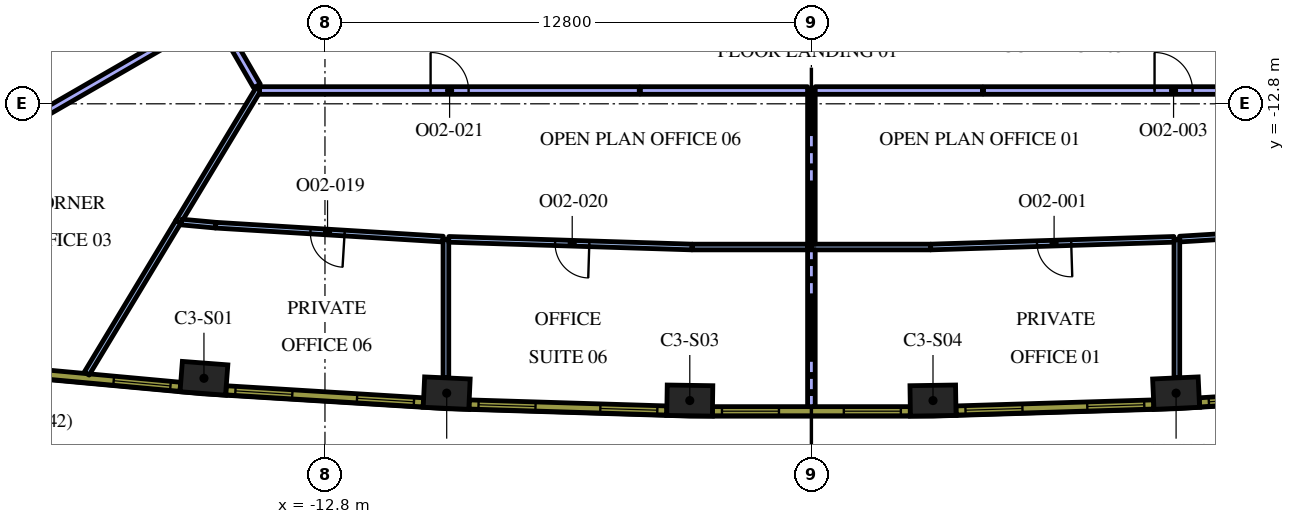
"""IFC4 building model, lengths in metres.
Left out: names, types, materials, properties, quantities, classifications, styles, units other than length and angle.
Written with IfcOpenShell. Run it as: python <this file> out.ifc"""

import sys

from ifc_helpers import new_model, si_unit, direction, frame, frame_2d, origin, origin_2d, place, context, subcontext, project, spatial, rectangle, extrude, element, fill, save


model = new_model("IFC4")
c1 = context("Model", 3, precision=1e-05, world=origin(), true_north=direction((0.0, 1.0)))
c2 = subcontext(c1, "Body", "Model", "MODEL_VIEW")
j1 = project(units=[si_unit("LENGTHUNIT", "METRE"), si_unit("PLANEANGLEUNIT", "RADIAN")], contexts=[c1])
p1 = place(None, origin())
s1 = spatial("IfcSite", under=j1, at=p1, CompositionType="ELEMENT")
p2 = place(p1, origin())
s2 = spatial("IfcBuilding", under=s1, at=p2, CompositionType="ELEMENT")
p3 = place(p2, frame((0.0, 0.0, 154.2)))
s3 = spatial("IfcBuildingStorey", under=s2, at=p3, CompositionType="ELEMENT", Elevation=154.2)
for number, where, z_axis, x_axis in (
    (1, (-15.985, -20.022, 0.0), (0.0, 0.0, 1.0), (0.997, -0.076, 0.0)),
    (2, (-9.597, -20.413, 0.0), (0.0, 0.0, 1.0), (0.999, -0.046, 0.0)),
    (3, (-3.2, -20.608, 0.0), (0.0, 0.0, 1.0), (1.0, -0.015, 0.0)),
    (4, (3.2, -20.608, 0.0), (0.0, 0.0, 1.0), (1.0, 0.015, 0.0)),
    (5, (9.597, -20.413, 0.0), (0.0, 0.0, 1.0), (0.999, 0.046, 0.0)),
):
    element("IfcColumn", number, at=place(p3, frame(where, z_axis=z_axis, x_axis=x_axis)), inside=s3, PredefinedType="COLUMN", context=c2, shape_type="SweptSolid", body=[
        extrude(rectangle(XDim=1.2, YDim=0.8, at=origin_2d()), origin(), (0.0, 0.0, 1.0), 4.2),
    ])
p4 = place(p3, frame((9.617, -16.364, 0.0), z_axis=(0.0, 0.0, 1.0), x_axis=(0.0, -1.0, 0.0)))
e6 = element("IfcWall", 6, at=p4, inside=s3, PredefinedType="PARTITIONING", context=c2, shape_type="SweptSolid", body=[
    extrude(rectangle(XDim=3.647, YDim=0.15, at=frame_2d((1.824, 0.0))), origin(), (0.0, 0.0, 1.0), 3.15),
])
p5 = place(p3, frame((0.0, -16.568, 0.0), z_axis=(0.0, 0.0, 1.0), x_axis=(1.0, 0.0, 0.0)))
e7 = element("IfcWall", 7, at=p5, inside=s3, PredefinedType="PARTITIONING", context=c2, shape_type="SweptSolid", body=[
    extrude(rectangle(XDim=3.138, YDim=0.15, at=frame_2d((1.569, 0.0))), origin(), (0.0, 0.0, 1.0), 3.15),
])
p6 = place(p3, frame((9.542, -16.366, 0.0), z_axis=(0.0, 0.0, 1.0), x_axis=(-0.999504575396, -0.031473858384, 0.0)))
e8 = element("IfcWall", 8, at=p6, inside=s3, PredefinedType="PARTITIONING", context=c2, shape_type="SweptSolid", body=[
    extrude(rectangle(XDim=6.407, YDim=0.15, at=frame_2d((3.204, 0.0))), origin(), (0.0, 0.0, 1.0), 3.15),
])
p7 = place(p6, frame((2.707, 0.0, 0.0)))
e9 = element("IfcOpeningElement", 9, at=p7, cuts=e8, PredefinedType="OPENING", context=c2, shape_type="SweptSolid", body=[
    extrude(rectangle(XDim=0.9, YDim=2.1, at=frame_2d((0.45, 1.05))), frame((0.0, 0.085, 0.0), z_axis=(0.0, -1.0, 0.0), x_axis=(1.0, 0.0, 0.0)), (0.0, 0.0, 1.0), 0.17),
])
p8 = place(p3, frame((0.0, -20.768, 0.0), z_axis=(0.0, 0.0, 1.0), x_axis=(0.0, 1.0, 0.0)))
e10 = element("IfcWall", 10, at=p8, inside=s3, PredefinedType="PARTITIONING", context=c2, shape_type="SweptSolid", body=[
    extrude(rectangle(XDim=4.125, YDim=0.2, at=frame_2d((2.062, 0.0))), origin(), (0.0, 0.0, 1.0), 3.15),
])
p9 = place(p3, frame((15.677, -15.994, 0.0), z_axis=(0.0, 0.0, 1.0), x_axis=(-0.998135339661, -0.061039689709, 0.0)))
e11 = element("IfcWall", 11, at=p9, inside=s3, PredefinedType="PARTITIONING", context=c2, shape_type="SweptSolid", body=[
    extrude(rectangle(XDim=5.996, YDim=0.15, at=frame_2d((2.998, 0.0))), origin(), (0.0, 0.0, 1.0), 3.15),
])
p10 = place(p9, frame((2.595, 0.0, 0.0)))
e12 = element("IfcOpeningElement", 12, at=p10, cuts=e11, PredefinedType="OPENING", context=c2, shape_type="SweptSolid", body=[
    extrude(rectangle(XDim=0.9, YDim=2.1, at=frame_2d((0.45, 1.05))), frame((0.0, 0.085, 0.0), z_axis=(0.0, -1.0, 0.0), x_axis=(1.0, 0.0, 0.0)), (0.0, 0.0, 1.0), 0.17),
])
p11 = place(p3, frame((0.0, -16.493, 0.0), z_axis=(0.0, 0.0, 1.0), x_axis=(0.0, 1.0, 0.0)))
e13 = element("IfcWall", 13, at=p11, inside=s3, PredefinedType="PARTITIONING", context=c2, shape_type="SweptSolid", body=[
    extrude(rectangle(XDim=4.043, YDim=0.2, at=frame_2d((2.021, 0.0))), origin(), (0.0, 0.0, 1.0), 3.15),
])
p12 = place(p3, frame((0.1, -12.45, 0.0), z_axis=(0.0, 0.0, 1.0), x_axis=(1.0, 0.0, 0.0)))
e14 = element("IfcWall", 14, at=p12, inside=s3, PredefinedType="PARTITIONING", context=c2, shape_type="SweptSolid", body=[
    extrude(rectangle(XDim=4.4, YDim=0.2, at=frame_2d((2.2, 0.0))), origin(), (0.0, 0.0, 1.0), 3.15),
])
p13 = place(p3, frame((4.53, -12.45, 0.0), z_axis=(0.0, 0.0, 1.0), x_axis=(1.0, 0.0, 0.0)))
e15 = element("IfcWall", 15, at=p13, inside=s3, PredefinedType="PARTITIONING", context=c2, shape_type="SweptSolid", body=[
    extrude(rectangle(XDim=9.99, YDim=0.2, at=frame_2d((4.995, 0.0))), origin(), (0.0, 0.0, 1.0), 3.15),
])
p14 = place(p13, frame((4.5, 0.0, 0.0)))
e16 = element("IfcOpeningElement", 16, at=p14, cuts=e15, PredefinedType="OPENING", context=c2, shape_type="SweptSolid", body=[
    extrude(rectangle(XDim=1.0, YDim=2.1, at=frame_2d((0.5, 1.05))), frame((0.0, 0.11, 0.0), z_axis=(0.0, -1.0, 0.0), x_axis=(1.0, 0.0, 0.0)), (0.0, 0.0, 1.0), 0.22),
])
p15 = place(p3, frame((-16.656, -15.9, 0.0), z_axis=(0.0, 0.0, 1.0), x_axis=(-0.516845255261, -0.856078841062, 0.0)))
e17 = element("IfcWall", 17, at=p15, inside=s3, PredefinedType="PARTITIONING", context=c2, shape_type="SweptSolid", body=[
    extrude(rectangle(XDim=4.672, YDim=0.15, at=frame_2d((2.336, 0.0))), origin(), (0.0, 0.0, 1.0), 3.15),
])
p16 = place(p3, frame((-14.546, -12.406, 0.0), z_axis=(0.0, 0.0, 1.0), x_axis=(-0.516811321583, -0.856099327113, 0.0)))
e18 = element("IfcWall", 18, at=p16, inside=s3, PredefinedType="PARTITIONING", context=c2, shape_type="SweptSolid", body=[
    extrude(rectangle(XDim=4.09, YDim=0.15, at=frame_2d((2.045, 0.0))), origin(), (0.0, 0.0, 1.0), 3.15),
])
p17 = place(p3, frame((-20.851, -13.424, 0.0), z_axis=(0.0, 0.0, 1.0), x_axis=(0.866007151214, 0.500031613047, 0.0)))
e19 = element("IfcWall", 19, at=p17, inside=s3, PredefinedType="PARTITIONING", context=c2, shape_type="SweptSolid", body=[
    extrude(rectangle(XDim=5.97, YDim=0.2, at=frame_2d((2.985, 0.0))), origin(), (0.0, 0.0, 1.0), 3.15),
])
p18 = place(p3, frame((-15.666, -10.465, 0.0), z_axis=(0.0, 0.0, 1.0), x_axis=(0.499977443261, -0.866038426532, 0.0)))
e20 = element("IfcWall", 20, at=p18, inside=s3, PredefinedType="PARTITIONING", context=c2, shape_type="SweptSolid", body=[
    extrude(rectangle(XDim=2.155, YDim=0.2, at=frame_2d((1.077, 0.0))), origin(), (0.0, 0.0, 1.0), 3.15),
])
p19 = place(p3, frame((-9.617, -16.364, 0.0), z_axis=(0.0, 0.0, 1.0), x_axis=(0.0, -1.0, 0.0)))
e21 = element("IfcWall", 21, at=p19, inside=s3, PredefinedType="PARTITIONING", context=c2, shape_type="SweptSolid", body=[
    extrude(rectangle(XDim=3.647, YDim=0.15, at=frame_2d((1.824, 0.0))), origin(), (0.0, 0.0, 1.0), 3.15),
])
p20 = place(p3, frame((-16.575, -15.911, 0.0), z_axis=(0.0, 0.0, 1.0), x_axis=(0.995808489615, -0.09146284497, 0.0)))
e22 = element("IfcWall", 22, at=p20, inside=s3, PredefinedType="PARTITIONING", context=c2, shape_type="SweptSolid", body=[
    extrude(rectangle(XDim=0.902, YDim=0.15, at=frame_2d((0.451, 0.0))), origin(), (0.0, 0.0, 1.0), 3.15),
])
p21 = place(p3, frame((-9.692, -16.36, 0.0), z_axis=(0.0, 0.0, 1.0), x_axis=(-0.998135339661, 0.061039689709, 0.0)))
e23 = element("IfcWall", 23, at=p21, inside=s3, PredefinedType="PARTITIONING", context=c2, shape_type="SweptSolid", body=[
    extrude(rectangle(XDim=5.996, YDim=0.15, at=frame_2d((2.998, 0.0))), origin(), (0.0, 0.0, 1.0), 3.15),
])
p22 = place(p21, frame((2.595, 0.0, 0.0)))
e24 = element("IfcOpeningElement", 24, at=p22, cuts=e23, PredefinedType="OPENING", context=c2, shape_type="SweptSolid", body=[
    extrude(rectangle(XDim=0.9, YDim=2.1, at=frame_2d((0.45, 1.05))), frame((0.0, 0.085, 0.0), z_axis=(0.0, -1.0, 0.0), x_axis=(1.0, 0.0, 0.0)), (0.0, 0.0, 1.0), 0.17),
])
p23 = place(p3, frame((-3.138, -16.568, 0.0), z_axis=(0.0, 0.0, 1.0), x_axis=(-0.999504575396, 0.031473858384, 0.0)))
e25 = element("IfcWall", 25, at=p23, inside=s3, PredefinedType="PARTITIONING", context=c2, shape_type="SweptSolid", body=[
    extrude(rectangle(XDim=6.407, YDim=0.15, at=frame_2d((3.204, 0.0))), origin(), (0.0, 0.0, 1.0), 3.15),
])
p24 = place(p23, frame((2.707, 0.0, 0.0)))
e26 = element("IfcOpeningElement", 26, at=p24, cuts=e25, PredefinedType="OPENING", context=c2, shape_type="SweptSolid", body=[
    extrude(rectangle(XDim=0.9, YDim=2.1, at=frame_2d((0.45, 1.05))), frame((0.0, 0.085, 0.0), z_axis=(0.0, -1.0, 0.0), x_axis=(1.0, 0.0, 0.0)), (0.0, 0.0, 1.0), 0.17),
])
p25 = place(p3, frame((-3.138, -16.568, 0.0), z_axis=(0.0, 0.0, 1.0), x_axis=(1.0, 0.0, 0.0)))
e27 = element("IfcWall", 27, at=p25, inside=s3, PredefinedType="PARTITIONING", context=c2, shape_type="SweptSolid", body=[
    extrude(rectangle(XDim=3.038, YDim=0.15, at=frame_2d((1.519, 0.0))), origin(), (0.0, 0.0, 1.0), 3.15),
])
p26 = place(p3, frame((-4.5, -12.45, 0.0), z_axis=(0.0, 0.0, 1.0), x_axis=(1.0, 0.0, 0.0)))
e28 = element("IfcWall", 28, at=p26, inside=s3, PredefinedType="PARTITIONING", context=c2, shape_type="SweptSolid", body=[
    extrude(rectangle(XDim=4.4, YDim=0.2, at=frame_2d((2.2, 0.0))), origin(), (0.0, 0.0, 1.0), 3.15),
])
p27 = place(p3, frame((-14.521, -12.45, 0.0), z_axis=(0.0, 0.0, 1.0), x_axis=(1.0, 0.0, 0.0)))
e29 = element("IfcWall", 29, at=p27, inside=s3, PredefinedType="PARTITIONING", context=c2, shape_type="SweptSolid", body=[
    extrude(rectangle(XDim=9.99, YDim=0.2, at=frame_2d((4.995, 0.0))), origin(), (0.0, 0.0, 1.0), 3.15),
])
p28 = place(p27, frame((4.5, 0.0, 0.0)))
e30 = element("IfcOpeningElement", 30, at=p28, cuts=e29, PredefinedType="OPENING", context=c2, shape_type="SweptSolid", body=[
    extrude(rectangle(XDim=1.0, YDim=2.1, at=frame_2d((0.5, 1.05))), frame((0.0, 0.11, 0.0), z_axis=(0.0, -1.0, 0.0), x_axis=(1.0, 0.0, 0.0)), (0.0, 0.0, 1.0), 0.22),
])
p29 = place(p3, frame((-21.797, -19.77, 0.0), z_axis=(0.0, 0.0, 1.0), x_axis=(0.995808712151, -0.091460422067, 0.0)))
e31 = element("IfcWall", 31, at=p29, inside=s3, PredefinedType="SOLIDWALL", context=c2, shape_type="SweptSolid", body=[
    extrude(rectangle(XDim=5.213, YDim=0.24, at=frame_2d((2.606, 0.0))), origin(), (0.0, 0.0, 1.0), 3.95),
])
p30 = place(p29, frame((0.221, 0.0, 0.9)))
e32 = element("IfcOpeningElement", 32, at=p30, cuts=e31, PredefinedType="OPENING", context=c2, shape_type="SweptSolid", body=[
    extrude(rectangle(XDim=1.5, YDim=2.55, at=frame_2d((0.75, 1.275))), frame((0.0, 0.13, 0.0), z_axis=(0.0, -1.0, 0.0), x_axis=(1.0, 0.0, 0.0)), (0.0, 0.0, 1.0), 0.26),
])
p31 = place(p29, frame((3.452, 0.0, 0.9)))
e33 = element("IfcOpeningElement", 33, at=p31, cuts=e31, PredefinedType="OPENING", context=c2, shape_type="SweptSolid", body=[
    extrude(rectangle(XDim=1.5, YDim=2.55, at=frame_2d((0.75, 1.275))), frame((0.0, 0.13, 0.0), z_axis=(0.0, -1.0, 0.0), x_axis=(1.0, 0.0, 0.0)), (0.0, 0.0, 1.0), 0.26),
])
p32 = place(p3, frame((-15.405, -20.338, 0.0), z_axis=(0.0, 0.0, 1.0), x_axis=(0.998135294646, -0.061040425794, 0.0)))
e34 = element("IfcWall", 34, at=p32, inside=s3, PredefinedType="SOLIDWALL", context=c2, shape_type="SweptSolid", body=[
    extrude(rectangle(XDim=5.204, YDim=0.24, at=frame_2d((2.602, 0.0))), origin(), (0.0, 0.0, 1.0), 3.95),
])
p33 = place(p32, frame((0.248, 0.0, 0.9)))
e35 = element("IfcOpeningElement", 35, at=p33, cuts=e34, PredefinedType="OPENING", context=c2, shape_type="SweptSolid", body=[
    extrude(rectangle(XDim=1.5, YDim=2.55, at=frame_2d((0.75, 1.275))), frame((0.0, 0.13, 0.0), z_axis=(0.0, -1.0, 0.0), x_axis=(1.0, 0.0, 0.0)), (0.0, 0.0, 1.0), 0.26),
])
p34 = place(p32, frame((3.455, 0.0, 0.9)))
e36 = element("IfcOpeningElement", 36, at=p34, cuts=e34, PredefinedType="OPENING", context=c2, shape_type="SweptSolid", body=[
    extrude(rectangle(XDim=1.5, YDim=2.55, at=frame_2d((0.75, 1.275))), frame((0.0, 0.13, 0.0), z_axis=(0.0, -1.0, 0.0), x_axis=(1.0, 0.0, 0.0)), (0.0, 0.0, 1.0), 0.26),
])
p35 = place(p3, frame((-9.007, -20.711, 0.0), z_axis=(0.0, 0.0, 1.0), x_axis=(0.999533441983, -0.030543384845, 0.0)))
e37 = element("IfcWall", 37, at=p35, inside=s3, PredefinedType="SOLIDWALL", context=c2, shape_type="SweptSolid", body=[
    extrude(rectangle(XDim=5.204, YDim=0.24, at=frame_2d((2.602, 0.0))), origin(), (0.0, 0.0, 1.0), 3.95),
])
p36 = place(p35, frame((0.248, 0.0, 0.9)))
e38 = element("IfcOpeningElement", 38, at=p36, cuts=e37, PredefinedType="OPENING", context=c2, shape_type="SweptSolid", body=[
    extrude(rectangle(XDim=1.5, YDim=2.55, at=frame_2d((0.75, 1.275))), frame((0.0, 0.13, 0.0), z_axis=(0.0, -1.0, 0.0), x_axis=(1.0, 0.0, 0.0)), (0.0, 0.0, 1.0), 0.26),
])
p37 = place(p35, frame((3.455, 0.0, 0.9)))
e39 = element("IfcOpeningElement", 39, at=p37, cuts=e37, PredefinedType="OPENING", context=c2, shape_type="SweptSolid", body=[
    extrude(rectangle(XDim=1.5, YDim=2.55, at=frame_2d((0.75, 1.275))), frame((0.0, 0.13, 0.0), z_axis=(0.0, -1.0, 0.0), x_axis=(1.0, 0.0, 0.0)), (0.0, 0.0, 1.0), 0.26),
])
p38 = place(p3, frame((-2.602, -20.888, 0.0), z_axis=(0.0, 0.0, 1.0), x_axis=(1.0, 0.0, 0.0)))
e40 = element("IfcWall", 40, at=p38, inside=s3, PredefinedType="SOLIDWALL", context=c2, shape_type="SweptSolid", body=[
    extrude(rectangle(XDim=5.204, YDim=0.24, at=frame_2d((2.602, 0.0))), origin(), (0.0, 0.0, 1.0), 3.95),
])
p39 = place(p38, frame((0.248, 0.0, 0.9)))
e41 = element("IfcOpeningElement", 41, at=p39, cuts=e40, PredefinedType="OPENING", context=c2, shape_type="SweptSolid", body=[
    extrude(rectangle(XDim=1.5, YDim=2.55, at=frame_2d((0.75, 1.275))), frame((0.0, 0.13, 0.0), z_axis=(0.0, -1.0, 0.0), x_axis=(1.0, 0.0, 0.0)), (0.0, 0.0, 1.0), 0.26),
])
p40 = place(p38, frame((3.455, 0.0, 0.9)))
e42 = element("IfcOpeningElement", 42, at=p40, cuts=e40, PredefinedType="OPENING", context=c2, shape_type="SweptSolid", body=[
    extrude(rectangle(XDim=1.5, YDim=2.55, at=frame_2d((0.75, 1.275))), frame((0.0, 0.13, 0.0), z_axis=(0.0, -1.0, 0.0), x_axis=(1.0, 0.0, 0.0)), (0.0, 0.0, 1.0), 0.26),
])
p41 = place(p3, frame((3.806, -20.87, 0.0), z_axis=(0.0, 0.0, 1.0), x_axis=(0.999533441983, 0.030543384845, 0.0)))
e43 = element("IfcWall", 43, at=p41, inside=s3, PredefinedType="SOLIDWALL", context=c2, shape_type="SweptSolid", body=[
    extrude(rectangle(XDim=5.204, YDim=0.24, at=frame_2d((2.602, 0.0))), origin(), (0.0, 0.0, 1.0), 3.95),
])
p42 = place(p41, frame((0.248, 0.0, 0.9)))
e44 = element("IfcOpeningElement", 44, at=p42, cuts=e43, PredefinedType="OPENING", context=c2, shape_type="SweptSolid", body=[
    extrude(rectangle(XDim=1.5, YDim=2.55, at=frame_2d((0.75, 1.275))), frame((0.0, 0.13, 0.0), z_axis=(0.0, -1.0, 0.0), x_axis=(1.0, 0.0, 0.0)), (0.0, 0.0, 1.0), 0.26),
])
p43 = place(p41, frame((3.455, 0.0, 0.9)))
e45 = element("IfcOpeningElement", 45, at=p43, cuts=e43, PredefinedType="OPENING", context=c2, shape_type="SweptSolid", body=[
    extrude(rectangle(XDim=1.5, YDim=2.55, at=frame_2d((0.75, 1.275))), frame((0.0, 0.13, 0.0), z_axis=(0.0, -1.0, 0.0), x_axis=(1.0, 0.0, 0.0)), (0.0, 0.0, 1.0), 0.26),
])
p44 = place(p3, frame((10.211, -20.656, 0.0), z_axis=(0.0, 0.0, 1.0), x_axis=(0.998135294646, 0.061040425794, 0.0)))
e46 = element("IfcWall", 46, at=p44, inside=s3, PredefinedType="SOLIDWALL", context=c2, shape_type="SweptSolid", body=[
    extrude(rectangle(XDim=5.204, YDim=0.24, at=frame_2d((2.602, 0.0))), origin(), (0.0, 0.0, 1.0), 3.95),
])
p45 = place(p44, frame((0.248, 0.0, 0.9)))
e47 = element("IfcOpeningElement", 47, at=p45, cuts=e46, PredefinedType="OPENING", context=c2, shape_type="SweptSolid", body=[
    extrude(rectangle(XDim=1.5, YDim=2.55, at=frame_2d((0.75, 1.275))), frame((0.0, 0.13, 0.0), z_axis=(0.0, -1.0, 0.0), x_axis=(1.0, 0.0, 0.0)), (0.0, 0.0, 1.0), 0.26),
])
p46 = place(p44, frame((3.455, 0.0, 0.9)))
e48 = element("IfcOpeningElement", 48, at=p46, cuts=e46, PredefinedType="OPENING", context=c2, shape_type="SweptSolid", body=[
    extrude(rectangle(XDim=1.5, YDim=2.55, at=frame_2d((0.75, 1.275))), frame((0.0, 0.13, 0.0), z_axis=(0.0, -1.0, 0.0), x_axis=(1.0, 0.0, 0.0)), (0.0, 0.0, 1.0), 0.26),
])
p47 = place(p7, origin())
e49 = element("IfcDoor", 49, at=p47, inside=s3, OperationType="SINGLE_SWING_LEFT", PredefinedType="DOOR", context=c2, shape_type="SweptSolid", body=[
    extrude(rectangle(XDim=0.9, YDim=2.1, at=frame_2d((0.45, 1.05))), frame((0.0, 0.025, 0.0), z_axis=(0.0, -1.0, 0.0), x_axis=(1.0, 0.0, 0.0)), (0.0, 0.0, 1.0), 0.05),
])
fill(e9, e49)
p48 = place(p14, origin())
e50 = element("IfcDoor", 50, at=p48, inside=s3, OperationType="SINGLE_SWING_RIGHT", PredefinedType="DOOR", context=c2, shape_type="SweptSolid", body=[
    extrude(rectangle(XDim=1.0, YDim=2.1, at=frame_2d((0.5, 1.05))), frame((0.0, 0.025, 0.0), z_axis=(0.0, -1.0, 0.0), x_axis=(1.0, 0.0, 0.0)), (0.0, 0.0, 1.0), 0.05),
])
fill(e16, e50)
p49 = place(p22, origin())
e51 = element("IfcDoor", 51, at=p49, inside=s3, OperationType="SINGLE_SWING_RIGHT", PredefinedType="DOOR", context=c2, shape_type="SweptSolid", body=[
    extrude(rectangle(XDim=0.9, YDim=2.1, at=frame_2d((0.45, 1.05))), frame((0.0, 0.025, 0.0), z_axis=(0.0, -1.0, 0.0), x_axis=(1.0, 0.0, 0.0)), (0.0, 0.0, 1.0), 0.05),
])
fill(e24, e51)
p50 = place(p24, origin())
e52 = element("IfcDoor", 52, at=p50, inside=s3, OperationType="SINGLE_SWING_LEFT", PredefinedType="DOOR", context=c2, shape_type="SweptSolid", body=[
    extrude(rectangle(XDim=0.9, YDim=2.1, at=frame_2d((0.45, 1.05))), frame((0.0, 0.025, 0.0), z_axis=(0.0, -1.0, 0.0), x_axis=(1.0, 0.0, 0.0)), (0.0, 0.0, 1.0), 0.05),
])
fill(e26, e52)
p51 = place(p28, origin())
e53 = element("IfcDoor", 53, at=p51, inside=s3, OperationType="SINGLE_SWING_RIGHT", PredefinedType="DOOR", context=c2, shape_type="SweptSolid", body=[
    extrude(rectangle(XDim=1.0, YDim=2.1, at=frame_2d((0.5, 1.05))), frame((0.0, 0.025, 0.0), z_axis=(0.0, -1.0, 0.0), x_axis=(1.0, 0.0, 0.0)), (0.0, 0.0, 1.0), 0.05),
])
fill(e30, e53)
p52 = place(p31, origin())
e54 = element("IfcWindow", 54, at=p52, inside=s3, PartitioningType="SINGLE_PANEL", PredefinedType="WINDOW", context=c2, shape_type="SweptSolid", body=[
    extrude(rectangle(XDim=1.5, YDim=2.55, at=frame_2d((0.75, 1.275))), frame((0.0, 0.04, 0.0), z_axis=(0.0, -1.0, 0.0), x_axis=(1.0, 0.0, 0.0)), (0.0, 0.0, 1.0), 0.06),
])
fill(e33, e54)
p53 = place(p33, origin())
e55 = element("IfcWindow", 55, at=p53, inside=s3, PartitioningType="SINGLE_PANEL", PredefinedType="WINDOW", context=c2, shape_type="SweptSolid", body=[
    extrude(rectangle(XDim=1.5, YDim=2.55, at=frame_2d((0.75, 1.275))), frame((0.0, 0.04, 0.0), z_axis=(0.0, -1.0, 0.0), x_axis=(1.0, 0.0, 0.0)), (0.0, 0.0, 1.0), 0.06),
])
fill(e35, e55)
p54 = place(p34, origin())
e56 = element("IfcWindow", 56, at=p54, inside=s3, PartitioningType="SINGLE_PANEL", PredefinedType="WINDOW", context=c2, shape_type="SweptSolid", body=[
    extrude(rectangle(XDim=1.5, YDim=2.55, at=frame_2d((0.75, 1.275))), frame((0.0, 0.04, 0.0), z_axis=(0.0, -1.0, 0.0), x_axis=(1.0, 0.0, 0.0)), (0.0, 0.0, 1.0), 0.06),
])
fill(e36, e56)
p55 = place(p36, origin())
e57 = element("IfcWindow", 57, at=p55, inside=s3, PartitioningType="SINGLE_PANEL", PredefinedType="WINDOW", context=c2, shape_type="SweptSolid", body=[
    extrude(rectangle(XDim=1.5, YDim=2.55, at=frame_2d((0.75, 1.275))), frame((0.0, 0.04, 0.0), z_axis=(0.0, -1.0, 0.0), x_axis=(1.0, 0.0, 0.0)), (0.0, 0.0, 1.0), 0.06),
])
fill(e38, e57)
p56 = place(p37, origin())
e58 = element("IfcWindow", 58, at=p56, inside=s3, PartitioningType="SINGLE_PANEL", PredefinedType="WINDOW", context=c2, shape_type="SweptSolid", body=[
    extrude(rectangle(XDim=1.5, YDim=2.55, at=frame_2d((0.75, 1.275))), frame((0.0, 0.04, 0.0), z_axis=(0.0, -1.0, 0.0), x_axis=(1.0, 0.0, 0.0)), (0.0, 0.0, 1.0), 0.06),
])
fill(e39, e58)
p57 = place(p39, origin())
e59 = element("IfcWindow", 59, at=p57, inside=s3, PartitioningType="SINGLE_PANEL", PredefinedType="WINDOW", context=c2, shape_type="SweptSolid", body=[
    extrude(rectangle(XDim=1.5, YDim=2.55, at=frame_2d((0.75, 1.275))), frame((0.0, 0.04, 0.0), z_axis=(0.0, -1.0, 0.0), x_axis=(1.0, 0.0, 0.0)), (0.0, 0.0, 1.0), 0.06),
])
fill(e41, e59)
p58 = place(p40, origin())
e60 = element("IfcWindow", 60, at=p58, inside=s3, PartitioningType="SINGLE_PANEL", PredefinedType="WINDOW", context=c2, shape_type="SweptSolid", body=[
    extrude(rectangle(XDim=1.5, YDim=2.55, at=frame_2d((0.75, 1.275))), frame((0.0, 0.04, 0.0), z_axis=(0.0, -1.0, 0.0), x_axis=(1.0, 0.0, 0.0)), (0.0, 0.0, 1.0), 0.06),
])
fill(e42, e60)
p59 = place(p42, origin())
e61 = element("IfcWindow", 61, at=p59, inside=s3, PartitioningType="SINGLE_PANEL", PredefinedType="WINDOW", context=c2, shape_type="SweptSolid", body=[
    extrude(rectangle(XDim=1.5, YDim=2.55, at=frame_2d((0.75, 1.275))), frame((0.0, 0.04, 0.0), z_axis=(0.0, -1.0, 0.0), x_axis=(1.0, 0.0, 0.0)), (0.0, 0.0, 1.0), 0.06),
])
fill(e44, e61)
p60 = place(p43, origin())
e62 = element("IfcWindow", 62, at=p60, inside=s3, PartitioningType="SINGLE_PANEL", PredefinedType="WINDOW", context=c2, shape_type="SweptSolid", body=[
    extrude(rectangle(XDim=1.5, YDim=2.55, at=frame_2d((0.75, 1.275))), frame((0.0, 0.04, 0.0), z_axis=(0.0, -1.0, 0.0), x_axis=(1.0, 0.0, 0.0)), (0.0, 0.0, 1.0), 0.06),
])
fill(e45, e62)
p61 = place(p45, origin())
e63 = element("IfcWindow", 63, at=p61, inside=s3, PartitioningType="SINGLE_PANEL", PredefinedType="WINDOW", context=c2, shape_type="SweptSolid", body=[
    extrude(rectangle(XDim=1.5, YDim=2.55, at=frame_2d((0.75, 1.275))), frame((0.0, 0.04, 0.0), z_axis=(0.0, -1.0, 0.0), x_axis=(1.0, 0.0, 0.0)), (0.0, 0.0, 1.0), 0.06),
])
fill(e47, e63)
save(model, sys.argv[1])
